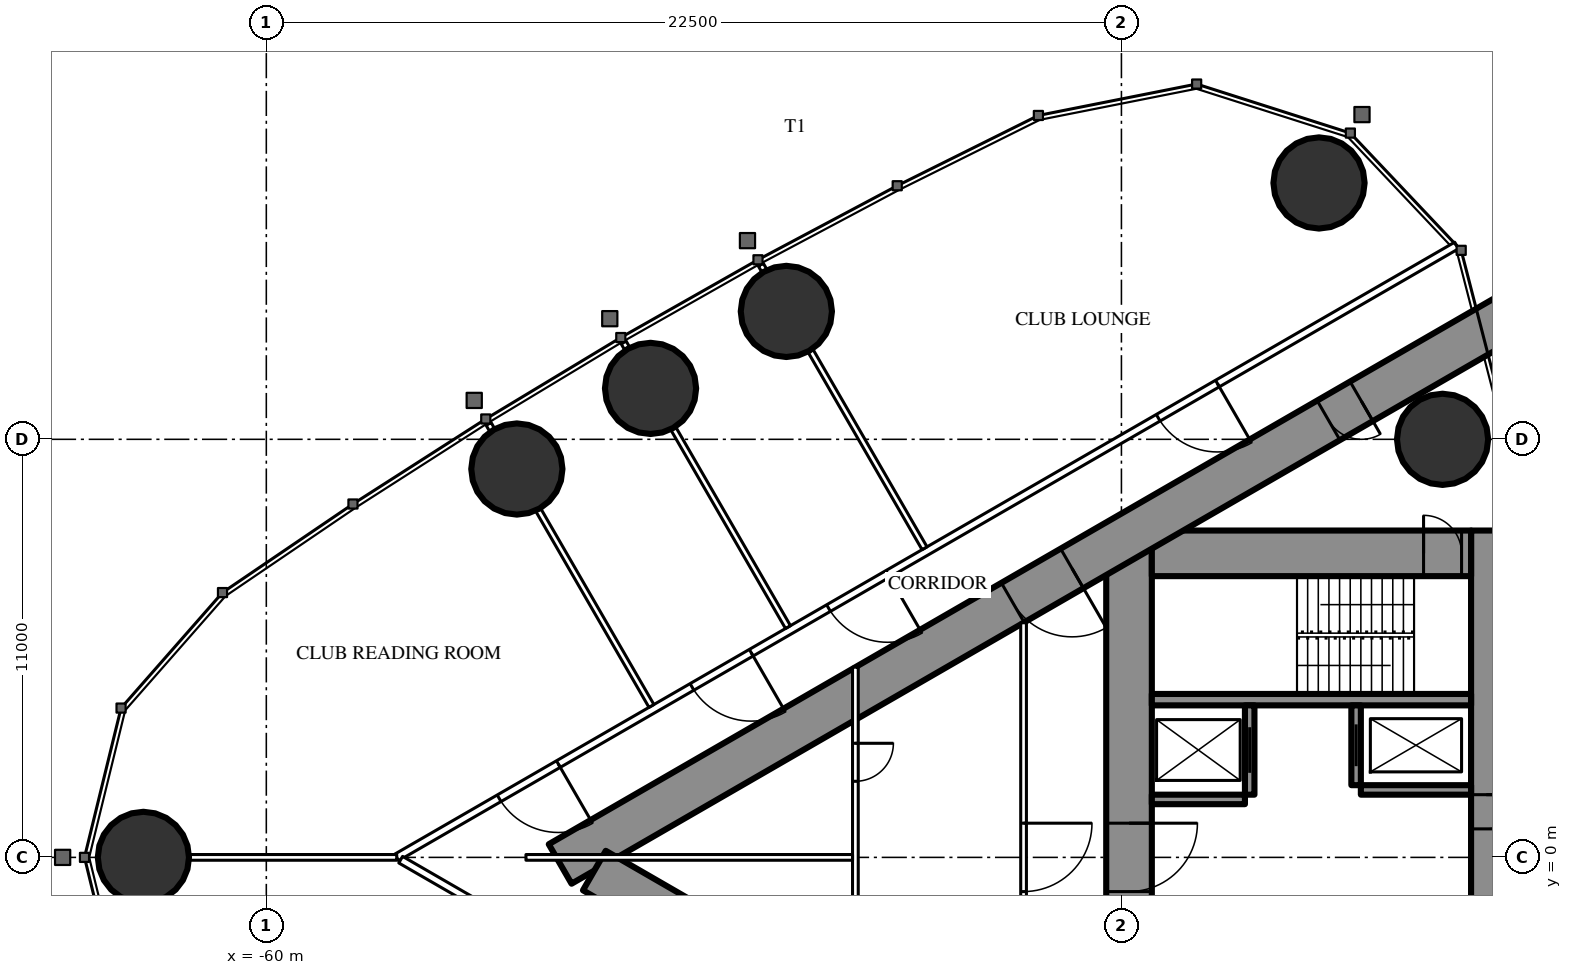
"""IFC4 building model, lengths in metres.
Left out: names, types, materials, properties, quantities, classifications, styles, units other than length and angle.
Written with IfcOpenShell. Run it as: python <this file> out.ifc"""

import sys

from ifc_helpers import new_model, si_unit, direction, frame, frame_2d, origin, origin_2d, place, context, subcontext, project, spatial, rectangle, circle, extrude, element, fill, save


model = new_model("IFC4")
c1 = context("Model", 3, precision=1e-05, world=origin(), true_north=direction((0.0, 1.0)))
c2 = subcontext(c1, "Body", "Model", "MODEL_VIEW")
j1 = project(units=[si_unit("LENGTHUNIT", "METRE"), si_unit("PLANEANGLEUNIT", "RADIAN")], contexts=[c1])
p1 = place(None, origin())
s1 = spatial("IfcSite", under=j1, at=p1, CompositionType="ELEMENT")
p2 = place(p1, origin())
s2 = spatial("IfcBuilding", under=s1, at=p2, CompositionType="ELEMENT")
p3 = place(p2, frame((0.0, 0.0, 247.7)))
s3 = spatial("IfcBuildingStorey", under=s2, at=p3, CompositionType="ELEMENT", Elevation=247.7)
for number, where, z_axis, x_axis in (
    (1, (-63.234, 0.0, 0.0), (0.0, 0.0, 1.0), (1.0, 0.0, 0.0)),
    (2, (-32.301, 17.745, 0.0), (0.0, 0.0, 1.0), (1.0, 0.0, 0.0)),
    (3, (-29.05, 11.0, 0.0), (0.0, 0.0, 1.0), (1.0, 0.0, 0.0)),
    (4, (-46.317, 14.365, 0.0), (0.0, 0.0, 1.0), (1.0, 0.0, 0.0)),
    (5, (-49.89, 12.34, 0.0), (0.0, 0.0, 1.0), (1.0, 0.0, 0.0)),
    (6, (-53.408, 10.219, 0.0), (0.0, 0.0, 1.0), (1.0, 0.0, 0.0)),
):
    element("IfcColumn", number, at=place(p3, frame(where, z_axis=z_axis, x_axis=x_axis)), inside=s3, PredefinedType="COLUMN", context=c2, shape_type="SweptSolid", body=[
        extrude(circle(Radius=1.2, at=origin_2d()), origin(), (0.0, 0.0, 1.0), 4.2),
    ])
p4 = place(p3, frame((-27.9, 8.6, 0.0), z_axis=(0.0, 0.0, 1.0), x_axis=(0.0, -1.0, 0.0)))
e7 = element("IfcWall", 7, at=p4, inside=s3, PredefinedType="SHEAR", context=c2, shape_type="SweptSolid", body=[
    extrude(rectangle(XDim=17.2, YDim=0.8, at=frame_2d((8.6, 0.0))), origin(), (0.0, 0.0, 1.0), 4.2),
])
p5 = place(p4, frame((6.95, 0.0, 0.0)))
e8 = element("IfcOpeningElement", 8, at=p5, cuts=e7, PredefinedType="OPENING", context=c2, shape_type="SweptSolid", body=[
    extrude(rectangle(XDim=0.9, YDim=2.2, at=frame_2d((0.45, 1.1))), frame((0.0, 0.41, 0.0), z_axis=(0.0, -1.0, 0.0), x_axis=(1.0, 0.0, 0.0)), (0.0, 0.0, 1.0), 0.82),
])
p6 = place(p3, frame((-37.3, 8.6, 0.0), z_axis=(0.0, 0.0, 1.0), x_axis=(0.0, -1.0, 0.0)))
e9 = element("IfcWall", 9, at=p6, inside=s3, PredefinedType="SHEAR", context=c2, shape_type="SweptSolid", body=[
    extrude(rectangle(XDim=17.2, YDim=1.2, at=frame_2d((8.6, 0.0))), origin(), (0.0, 0.0, 1.0), 4.2),
])
p7 = place(p6, frame((7.7, 0.0, 0.0)))
e10 = element("IfcOpeningElement", 10, at=p7, cuts=e9, PredefinedType="OPENING", context=c2, shape_type="SweptSolid", body=[
    extrude(rectangle(XDim=1.8, YDim=2.2, at=frame_2d((0.9, 1.1))), frame((0.0, 0.61, 0.0), z_axis=(0.0, -1.0, 0.0), x_axis=(1.0, 0.0, 0.0)), (0.0, 0.0, 1.0), 1.22),
])
p8 = place(p3, frame((-28.3, 8.0, 0.0), z_axis=(0.0, 0.0, 1.0), x_axis=(-1.0, 0.0, 0.0)))
e11 = element("IfcWall", 11, at=p8, inside=s3, PredefinedType="SHEAR", context=c2, shape_type="SweptSolid", body=[
    extrude(rectangle(XDim=8.4, YDim=1.2, at=frame_2d((4.2, 0.0))), origin(), (0.0, 0.0, 1.0), 4.2),
])
p9 = place(p8, frame((0.25, 0.0, 0.0)))
e12 = element("IfcOpeningElement", 12, at=p9, cuts=e11, PredefinedType="OPENING", context=c2, shape_type="SweptSolid", body=[
    extrude(rectangle(XDim=1.0, YDim=2.2, at=frame_2d((0.5, 1.1))), frame((0.0, 0.61, 0.0), z_axis=(0.0, -1.0, 0.0), x_axis=(1.0, 0.0, 0.0)), (0.0, 0.0, 1.0), 1.22),
])
p10 = place(p3, frame((-28.3, 4.15, 0.0), z_axis=(0.0, 0.0, 1.0), x_axis=(-1.0, 0.0, 0.0)))
e13 = element("IfcWall", 13, at=p10, inside=s3, PredefinedType="SHEAR", context=c2, shape_type="SweptSolid", body=[
    extrude(rectangle(XDim=8.4, YDim=0.3, at=frame_2d((4.2, 0.0))), origin(), (0.0, 0.0, 1.0), 4.2),
])
p11 = place(p3, frame((-31.325, 4.0, 0.0), z_axis=(0.0, 0.0, 1.0), x_axis=(0.0, -1.0, 0.0)))
e14 = element("IfcWall", 14, at=p11, inside=s3, PredefinedType="SHEAR", context=c2, shape_type="SweptSolid", body=[
    extrude(rectangle(XDim=2.1, YDim=0.25, at=frame_2d((1.05, 0.0))), origin(), (0.0, 0.0, 1.0), 4.2),
])
p12 = place(p11, frame((0.5, 0.0, 0.0)))
e15 = element("IfcOpeningElement", 15, at=p12, cuts=e14, PredefinedType="OPENING", context=c2, shape_type="SweptSolid", body=[
    extrude(rectangle(XDim=1.1, YDim=2.2, at=frame_2d((0.55, 1.1))), frame((0.0, 0.135, 0.0), z_axis=(0.0, -1.0, 0.0), x_axis=(1.0, 0.0, 0.0)), (0.0, 0.0, 1.0), 0.27),
])
p13 = place(p3, frame((-34.125, 4.0, 0.0), z_axis=(0.0, 0.0, 1.0), x_axis=(0.0, -1.0, 0.0)))
e16 = element("IfcWall", 16, at=p13, inside=s3, PredefinedType="SHEAR", context=c2, shape_type="SweptSolid", body=[
    extrude(rectangle(XDim=2.35, YDim=0.25, at=frame_2d((1.175, 0.0))), origin(), (0.0, 0.0, 1.0), 4.2),
])
p14 = place(p13, frame((0.575, 0.0, 0.0)))
e17 = element("IfcOpeningElement", 17, at=p14, cuts=e16, PredefinedType="OPENING", context=c2, shape_type="SweptSolid", body=[
    extrude(rectangle(XDim=1.2, YDim=2.2, at=frame_2d((0.6, 1.1))), frame((0.0, 0.135, 0.0), z_axis=(0.0, -1.0, 0.0), x_axis=(1.0, 0.0, 0.0)), (0.0, 0.0, 1.0), 0.27),
])
p15 = place(p3, frame((-28.3, 1.775, 0.0), z_axis=(0.0, 0.0, 1.0), x_axis=(-1.0, 0.0, 0.0)))
e18 = element("IfcWall", 18, at=p15, inside=s3, PredefinedType="SHEAR", context=c2, shape_type="SweptSolid", body=[
    extrude(rectangle(XDim=2.9, YDim=0.25, at=frame_2d((1.45, 0.0))), origin(), (0.0, 0.0, 1.0), 4.2),
])
p16 = place(p3, frame((-34.25, 1.525, 0.0), z_axis=(0.0, 0.0, 1.0), x_axis=(-1.0, 0.0, 0.0)))
e19 = element("IfcWall", 19, at=p16, inside=s3, PredefinedType="SHEAR", context=c2, shape_type="SweptSolid", body=[
    extrude(rectangle(XDim=2.45, YDim=0.25, at=frame_2d((1.225, 0.0))), origin(), (0.0, 0.0, 1.0), 4.2),
])
p17 = place(p3, frame((-27.2, 14.3, 0.0), z_axis=(0.0, 0.0, 1.0), x_axis=(-0.866026593062, -0.499997940104, 0.0)))
e20 = element("IfcWall", 20, at=p17, inside=s3, PredefinedType="SHEAR", context=c2, shape_type="SweptSolid", body=[
    extrude(rectangle(XDim=28.946, YDim=1.2, at=frame_2d((14.473, 0.0))), origin(), (0.0, 0.0, 1.0), 4.2),
])
p18 = place(p17, frame((4.6, 0.0, 0.0)))
e21 = element("IfcOpeningElement", 21, at=p18, cuts=e20, PredefinedType="OPENING", context=c2, shape_type="SweptSolid", body=[
    extrude(rectangle(XDim=1.0, YDim=2.2, at=frame_2d((0.5, 1.1))), frame((0.0, 0.61, 0.0), z_axis=(0.0, -1.0, 0.0), x_axis=(1.0, 0.0, 0.0)), (0.0, 0.0, 1.0), 1.22),
])
p19 = place(p17, frame((13.395, 0.0, 0.0)))
e22 = element("IfcOpeningElement", 22, at=p19, cuts=e20, PredefinedType="OPENING", context=c2, shape_type="SweptSolid", body=[
    extrude(rectangle(XDim=1.8, YDim=2.2, at=frame_2d((0.9, 1.1))), frame((0.0, 0.61, 0.0), z_axis=(0.0, -1.0, 0.0), x_axis=(1.0, 0.0, 0.0)), (0.0, 0.0, 1.0), 1.22),
])
p20 = place(p3, frame((-27.2, -14.3, 0.0), z_axis=(0.0, 0.0, 1.0), x_axis=(-0.866024021859, 0.500002393557, 0.0)))
e23 = element("IfcWall", 23, at=p20, inside=s3, PredefinedType="SHEAR", context=c2, shape_type="SweptSolid", body=[
    extrude(rectangle(XDim=27.907, YDim=1.2, at=frame_2d((13.954, 0.0))), origin(), (0.0, 0.0, 1.0), 4.2),
])
p21 = place(p20, frame((4.6, 0.0, 0.0)))
e24 = element("IfcOpeningElement", 24, at=p21, cuts=e23, PredefinedType="OPENING", context=c2, shape_type="SweptSolid", body=[
    extrude(rectangle(XDim=1.0, YDim=2.2, at=frame_2d((0.5, 1.1))), frame((0.0, 0.61, 0.0), z_axis=(0.0, -1.0, 0.0), x_axis=(1.0, 0.0, 0.0)), (0.0, 0.0, 1.0), 1.22),
])
p22 = place(p20, frame((13.395, 0.0, 0.0)))
e25 = element("IfcOpeningElement", 25, at=p22, cuts=e23, PredefinedType="OPENING", context=c2, shape_type="SweptSolid", body=[
    extrude(rectangle(XDim=1.8, YDim=2.2, at=frame_2d((0.9, 1.1))), frame((0.0, 0.61, 0.0), z_axis=(0.0, -1.0, 0.0), x_axis=(1.0, 0.0, 0.0)), (0.0, 0.0, 1.0), 1.22),
])
p23 = place(p3, frame((-28.681, 16.101, 0.0), z_axis=(0.0, 0.0, 1.0), x_axis=(-0.866024860443, -0.500000941094, 0.0)))
e26 = element("IfcWall", 26, at=p23, inside=s3, PredefinedType="PARTITIONING", context=c2, shape_type="SweptSolid", body=[
    extrude(rectangle(XDim=32.201, YDim=0.2, at=frame_2d((16.101, 0.0))), origin(), (0.0, 0.0, 1.0), 3.95),
])
p24 = place(p23, frame((7.266, 0.0, 0.0)))
e27 = element("IfcOpeningElement", 27, at=p24, cuts=e26, PredefinedType="OPENING", context=c2, shape_type="SweptSolid", body=[
    extrude(rectangle(XDim=1.8, YDim=2.2, at=frame_2d((0.9, 1.1))), frame((0.0, 0.11, 0.0), z_axis=(0.0, -1.0, 0.0), x_axis=(1.0, 0.0, 0.0)), (0.0, 0.0, 1.0), 0.22),
])
p25 = place(p23, frame((17.281, 0.0, 0.0)))
e28 = element("IfcOpeningElement", 28, at=p25, cuts=e26, PredefinedType="OPENING", context=c2, shape_type="SweptSolid", body=[
    extrude(rectangle(XDim=1.8, YDim=2.2, at=frame_2d((0.9, 1.1))), frame((0.0, 0.11, 0.0), z_axis=(0.0, -1.0, 0.0), x_axis=(1.0, 0.0, 0.0)), (0.0, 0.0, 1.0), 0.22),
])
p26 = place(p23, frame((21.43, 0.0, 0.0)))
e29 = element("IfcOpeningElement", 29, at=p26, cuts=e26, PredefinedType="OPENING", context=c2, shape_type="SweptSolid", body=[
    extrude(rectangle(XDim=1.8, YDim=2.2, at=frame_2d((0.9, 1.1))), frame((0.0, 0.11, 0.0), z_axis=(0.0, -1.0, 0.0), x_axis=(1.0, 0.0, 0.0)), (0.0, 0.0, 1.0), 0.22),
])
p27 = place(p23, frame((27.29, 0.0, 0.0)))
e30 = element("IfcOpeningElement", 30, at=p27, cuts=e26, PredefinedType="OPENING", context=c2, shape_type="SweptSolid", body=[
    extrude(rectangle(XDim=1.8, YDim=2.2, at=frame_2d((0.9, 1.1))), frame((0.0, 0.11, 0.0), z_axis=(0.0, -1.0, 0.0), x_axis=(1.0, 0.0, 0.0)), (0.0, 0.0, 1.0), 0.22),
])
p28 = place(p3, frame((-42.68, 8.134, 0.0), z_axis=(0.0, 0.0, 1.0), x_axis=(-0.499984479505, 0.866034364361, 0.0)))
e31 = element("IfcWall", 31, at=p28, inside=s3, PredefinedType="PARTITIONING", context=c2, shape_type="SweptSolid", body=[
    extrude(rectangle(XDim=5.995, YDim=0.15, at=frame_2d((2.998, 0.0))), origin(), (0.0, 0.0, 1.0), 3.05),
])
p29 = place(p3, frame((-46.898, 15.439, 0.0), z_axis=(0.0, 0.0, 1.0), x_axis=(-0.500232303069, 0.865891241997, 0.0)))
e32 = element("IfcWall", 32, at=p29, inside=s3, PredefinedType="PARTITIONING", context=c2, shape_type="SweptSolid", body=[
    extrude(rectangle(XDim=0.18, YDim=0.15, at=frame_2d((0.09, 0.0))), origin(), (0.0, 0.0, 1.0), 3.05),
])
p30 = place(p3, frame((-46.274, 6.059, 0.0), z_axis=(0.0, 0.0, 1.0), x_axis=(-0.500020471368, 0.866013584312, 0.0)))
e33 = element("IfcWall", 33, at=p30, inside=s3, PredefinedType="PARTITIONING", context=c2, shape_type="SweptSolid", body=[
    extrude(rectangle(XDim=6.028, YDim=0.15, at=frame_2d((3.014, 0.0))), origin(), (0.0, 0.0, 1.0), 3.05),
])
p31 = place(p3, frame((-50.508, 13.392, 0.0), z_axis=(0.0, 0.0, 1.0), x_axis=(-0.499644091975, 0.866230789891, 0.0)))
e34 = element("IfcWall", 34, at=p31, inside=s3, PredefinedType="PARTITIONING", context=c2, shape_type="SweptSolid", body=[
    extrude(rectangle(XDim=0.18, YDim=0.15, at=frame_2d((0.09, 0.0))), origin(), (0.0, 0.0, 1.0), 3.05),
])
p32 = place(p3, frame((-49.866, 3.985, 0.0), z_axis=(0.0, 0.0, 1.0), x_axis=(-0.500000694566, 0.866025002776, 0.0)))
e35 = element("IfcWall", 35, at=p32, inside=s3, PredefinedType="PARTITIONING", context=c2, shape_type="SweptSolid", body=[
    extrude(rectangle(XDim=5.95, YDim=0.15, at=frame_2d((2.975, 0.0))), origin(), (0.0, 0.0, 1.0), 3.05),
])
p33 = place(p3, frame((-54.061, 11.25, 0.0), z_axis=(0.0, 0.0, 1.0), x_axis=(-0.500391173478, 0.865799441849, 0.0)))
e36 = element("IfcWall", 36, at=p33, inside=s3, PredefinedType="PARTITIONING", context=c2, shape_type="SweptSolid", body=[
    extrude(rectangle(XDim=0.179, YDim=0.15, at=frame_2d((0.089, 0.0))), origin(), (0.0, 0.0, 1.0), 3.05),
])
p34 = place(p3, frame((-56.568, 0.0, 0.0), z_axis=(0.0, 0.0, 1.0), x_axis=(-1.0, 0.0, 0.0)))
e37 = element("IfcWall", 37, at=p34, inside=s3, PredefinedType="PARTITIONING", context=c2, shape_type="SweptSolid", body=[
    extrude(rectangle(XDim=5.446, YDim=0.15, at=frame_2d((2.723, 0.0))), origin(), (0.0, 0.0, 1.0), 3.05),
])
p35 = place(p3, frame((-44.715, -6.844, 0.0), z_axis=(0.0, 0.0, 1.0), x_axis=(-0.866025261224, 0.500000246922, 0.0)))
e38 = element("IfcWall", 38, at=p35, inside=s3, PredefinedType="PARTITIONING", context=c2, shape_type="SweptSolid", body=[
    extrude(rectangle(XDim=13.567, YDim=0.2, at=frame_2d((6.783, 0.0))), origin(), (0.0, 0.0, 1.0), 3.95),
])
p36 = place(p35, frame((8.716, 0.0, 0.0)))
e39 = element("IfcOpeningElement", 39, at=p36, cuts=e38, PredefinedType="OPENING", context=c2, shape_type="SweptSolid", body=[
    extrude(rectangle(XDim=1.8, YDim=2.2, at=frame_2d((0.9, 1.1))), frame((0.0, 0.11, 0.0), z_axis=(0.0, -1.0, 0.0), x_axis=(1.0, 0.0, 0.0)), (0.0, 0.0, 1.0), 0.22),
])
p37 = place(p35, frame((2.916, 0.0, 0.0)))
e40 = element("IfcOpeningElement", 40, at=p37, cuts=e38, PredefinedType="OPENING", context=c2, shape_type="SweptSolid", body=[
    extrude(rectangle(XDim=1.8, YDim=2.2, at=frame_2d((0.9, 1.1))), frame((0.0, 0.11, 0.0), z_axis=(0.0, -1.0, 0.0), x_axis=(1.0, 0.0, 0.0)), (0.0, 0.0, 1.0), 0.22),
])
p38 = place(p35, frame((0.5, 0.0, 0.0)))
e41 = element("IfcOpeningElement", 41, at=p38, cuts=e38, PredefinedType="OPENING", context=c2, shape_type="SweptSolid", body=[
    extrude(rectangle(XDim=0.967, YDim=2.2, at=frame_2d((0.483, 1.1))), frame((0.0, 0.11, 0.0), z_axis=(0.0, -1.0, 0.0), x_axis=(1.0, 0.0, 0.0)), (0.0, 0.0, 1.0), 0.22),
])
p39 = place(p3, frame((-40.075, 6.174, 0.0), z_axis=(0.0, 0.0, 1.0), x_axis=(0.0, -1.0, 0.0)))
e42 = element("IfcWall", 42, at=p39, inside=s3, PredefinedType="PARTITIONING", context=c2, shape_type="SweptSolid", body=[
    extrude(rectangle(XDim=12.348, YDim=0.15, at=frame_2d((6.174, 0.0))), origin(), (0.0, 0.0, 1.0), 3.95),
])
p40 = place(p39, frame((5.274, 0.0, 0.0)))
e43 = element("IfcOpeningElement", 43, at=p40, cuts=e42, PredefinedType="OPENING", context=c2, shape_type="SweptSolid", body=[
    extrude(rectangle(XDim=1.8, YDim=2.2, at=frame_2d((0.9, 1.1))), frame((0.0, 0.085, 0.0), z_axis=(0.0, -1.0, 0.0), x_axis=(1.0, 0.0, 0.0)), (0.0, 0.0, 1.0), 0.17),
])
p41 = place(p3, frame((-44.5, 5.005, 0.0), z_axis=(0.0, 0.0, 1.0), x_axis=(0.0, -1.0, 0.0)))
e44 = element("IfcWall", 44, at=p41, inside=s3, PredefinedType="PARTITIONING", context=c2, shape_type="SweptSolid", body=[
    extrude(rectangle(XDim=10.009, YDim=0.15, at=frame_2d((5.005, 0.0))), origin(), (0.0, 0.0, 1.0), 3.1),
])
p42 = place(p41, frame((2.002, 0.0, 0.0)))
e45 = element("IfcOpeningElement", 45, at=p42, cuts=e44, PredefinedType="OPENING", context=c2, shape_type="SweptSolid", body=[
    extrude(rectangle(XDim=1.0, YDim=2.2, at=frame_2d((0.5, 1.1))), frame((0.0, 0.085, 0.0), z_axis=(0.0, -1.0, 0.0), x_axis=(1.0, 0.0, 0.0)), (0.0, 0.0, 1.0), 0.17),
])
p43 = place(p41, frame((7.007, 0.0, 0.0)))
e46 = element("IfcOpeningElement", 46, at=p43, cuts=e44, PredefinedType="OPENING", context=c2, shape_type="SweptSolid", body=[
    extrude(rectangle(XDim=1.0, YDim=2.2, at=frame_2d((0.5, 1.1))), frame((0.0, 0.085, 0.0), z_axis=(0.0, -1.0, 0.0), x_axis=(1.0, 0.0, 0.0)), (0.0, 0.0, 1.0), 0.17),
])
p44 = place(p3, frame((-44.575, 0.0, 0.0), z_axis=(0.0, 0.0, 1.0), x_axis=(-1.0, 0.0, 0.0)))
e47 = element("IfcWall", 47, at=p44, inside=s3, PredefinedType="PARTITIONING", context=c2, shape_type="SweptSolid", body=[
    extrude(rectangle(XDim=8.593, YDim=0.15, at=frame_2d((4.297, 0.0))), origin(), (0.0, 0.0, 1.0), 3.05),
])
p45 = place(p24, origin())
e48 = element("IfcDoor", 48, at=p45, inside=s3, OperationType="DOUBLE_DOOR_SINGLE_SWING", PredefinedType="DOOR", context=c2, shape_type="SweptSolid", body=[
    extrude(rectangle(XDim=1.8, YDim=2.2, at=frame_2d((0.9, 1.1))), frame((0.0, 0.025, 0.0), z_axis=(0.0, -1.0, 0.0), x_axis=(1.0, 0.0, 0.0)), (0.0, 0.0, 1.0), 0.05),
])
fill(e27, e48)
p46 = place(p25, origin())
e49 = element("IfcDoor", 49, at=p46, inside=s3, OperationType="DOUBLE_DOOR_SINGLE_SWING", PredefinedType="DOOR", context=c2, shape_type="SweptSolid", body=[
    extrude(rectangle(XDim=1.8, YDim=2.2, at=frame_2d((0.9, 1.1))), frame((0.0, 0.025, 0.0), z_axis=(0.0, -1.0, 0.0), x_axis=(1.0, 0.0, 0.0)), (0.0, 0.0, 1.0), 0.05),
])
fill(e28, e49)
p47 = place(p26, origin())
e50 = element("IfcDoor", 50, at=p47, inside=s3, OperationType="DOUBLE_DOOR_SINGLE_SWING", PredefinedType="DOOR", context=c2, shape_type="SweptSolid", body=[
    extrude(rectangle(XDim=1.8, YDim=2.2, at=frame_2d((0.9, 1.1))), frame((0.0, 0.025, 0.0), z_axis=(0.0, -1.0, 0.0), x_axis=(1.0, 0.0, 0.0)), (0.0, 0.0, 1.0), 0.05),
])
fill(e29, e50)
p48 = place(p27, origin())
e51 = element("IfcDoor", 51, at=p48, inside=s3, OperationType="DOUBLE_DOOR_SINGLE_SWING", PredefinedType="DOOR", context=c2, shape_type="SweptSolid", body=[
    extrude(rectangle(XDim=1.8, YDim=2.2, at=frame_2d((0.9, 1.1))), frame((0.0, 0.025, 0.0), z_axis=(0.0, -1.0, 0.0), x_axis=(1.0, 0.0, 0.0)), (0.0, 0.0, 1.0), 0.05),
])
fill(e30, e51)
p49 = place(p40, origin())
e52 = element("IfcDoor", 52, at=p49, inside=s3, OperationType="DOUBLE_DOOR_SINGLE_SWING", PredefinedType="DOOR", context=c2, shape_type="SweptSolid", body=[
    extrude(rectangle(XDim=1.8, YDim=2.2, at=frame_2d((0.9, 1.1))), frame((0.0, 0.025, 0.0), z_axis=(0.0, -1.0, 0.0), x_axis=(1.0, 0.0, 0.0)), (0.0, 0.0, 1.0), 0.05),
])
fill(e43, e52)
p50 = place(p42, origin())
e53 = element("IfcDoor", 53, at=p50, inside=s3, OperationType="SINGLE_SWING_LEFT", PredefinedType="DOOR", context=c2, shape_type="SweptSolid", body=[
    extrude(rectangle(XDim=1.0, YDim=2.2, at=frame_2d((0.5, 1.1))), frame((0.0, 0.025, 0.0), z_axis=(0.0, -1.0, 0.0), x_axis=(1.0, 0.0, 0.0)), (0.0, 0.0, 1.0), 0.05),
])
fill(e45, e53)
p51 = place(p18, origin())
e54 = element("IfcDoor", 54, at=p51, inside=s3, OperationType="SINGLE_SWING_LEFT", PredefinedType="DOOR", context=c2, shape_type="SweptSolid", body=[
    extrude(rectangle(XDim=1.0, YDim=2.2, at=frame_2d((0.5, 1.1))), frame((0.0, 0.025, 0.0), z_axis=(0.0, -1.0, 0.0), x_axis=(1.0, 0.0, 0.0)), (0.0, 0.0, 1.0), 0.05),
])
fill(e21, e54)
p52 = place(p19, origin())
e55 = element("IfcDoor", 55, at=p52, inside=s3, OperationType="DOUBLE_DOOR_SINGLE_SWING", PredefinedType="DOOR", context=c2, shape_type="SweptSolid", body=[
    extrude(rectangle(XDim=1.8, YDim=2.2, at=frame_2d((0.9, 1.1))), frame((0.0, 0.025, 0.0), z_axis=(0.0, -1.0, 0.0), x_axis=(1.0, 0.0, 0.0)), (0.0, 0.0, 1.0), 0.05),
])
fill(e22, e55)
p53 = place(p7, origin())
e56 = element("IfcDoor", 56, at=p53, inside=s3, OperationType="DOUBLE_DOOR_SINGLE_SWING", PredefinedType="DOOR", context=c2, shape_type="SweptSolid", body=[
    extrude(rectangle(XDim=1.8, YDim=2.2, at=frame_2d((0.9, 1.1))), frame((0.0, 0.025, 0.0), z_axis=(0.0, -1.0, 0.0), x_axis=(1.0, 0.0, 0.0)), (0.0, 0.0, 1.0), 0.05),
])
fill(e10, e56)
p54 = place(p9, origin())
e57 = element("IfcDoor", 57, at=p54, inside=s3, OperationType="SINGLE_SWING_RIGHT", PredefinedType="DOOR", context=c2, shape_type="SweptSolid", body=[
    extrude(rectangle(XDim=1.0, YDim=2.2, at=frame_2d((0.5, 1.1))), frame((0.0, 0.025, 0.0), z_axis=(0.0, -1.0, 0.0), x_axis=(1.0, 0.0, 0.0)), (0.0, 0.0, 1.0), 0.05),
])
fill(e12, e57)
p55 = place(p5, origin())
e58 = element("IfcDoor", 58, at=p55, inside=s3, OperationType="SINGLE_SWING_LEFT", PredefinedType="DOOR", context=c2, shape_type="SweptSolid", body=[
    extrude(rectangle(XDim=0.9, YDim=2.2, at=frame_2d((0.45, 1.1))), frame((0.0, 0.025, 0.0), z_axis=(0.0, -1.0, 0.0), x_axis=(1.0, 0.0, 0.0)), (0.0, 0.0, 1.0), 0.05),
])
fill(e8, e58)
p56 = place(p12, origin())
e59 = element("IfcDoor", 59, at=p56, inside=s3, OperationType="SLIDING_TO_LEFT", PredefinedType="USERDEFINED", context=c2, shape_type="SweptSolid", body=[
    extrude(rectangle(XDim=1.1, YDim=2.2, at=frame_2d((0.55, 1.1))), frame((0.0, 0.025, 0.0), z_axis=(0.0, -1.0, 0.0), x_axis=(1.0, 0.0, 0.0)), (0.0, 0.0, 1.0), 0.05),
])
fill(e15, e59)
p57 = place(p14, origin())
e60 = element("IfcDoor", 60, at=p57, inside=s3, OperationType="DOUBLE_DOOR_SLIDING", PredefinedType="USERDEFINED", context=c2, shape_type="SweptSolid", body=[
    extrude(rectangle(XDim=1.2, YDim=2.2, at=frame_2d((0.6, 1.1))), frame((0.0, 0.025, 0.0), z_axis=(0.0, -1.0, 0.0), x_axis=(1.0, 0.0, 0.0)), (0.0, 0.0, 1.0), 0.05),
])
fill(e17, e60)
save(model, sys.argv[1])
